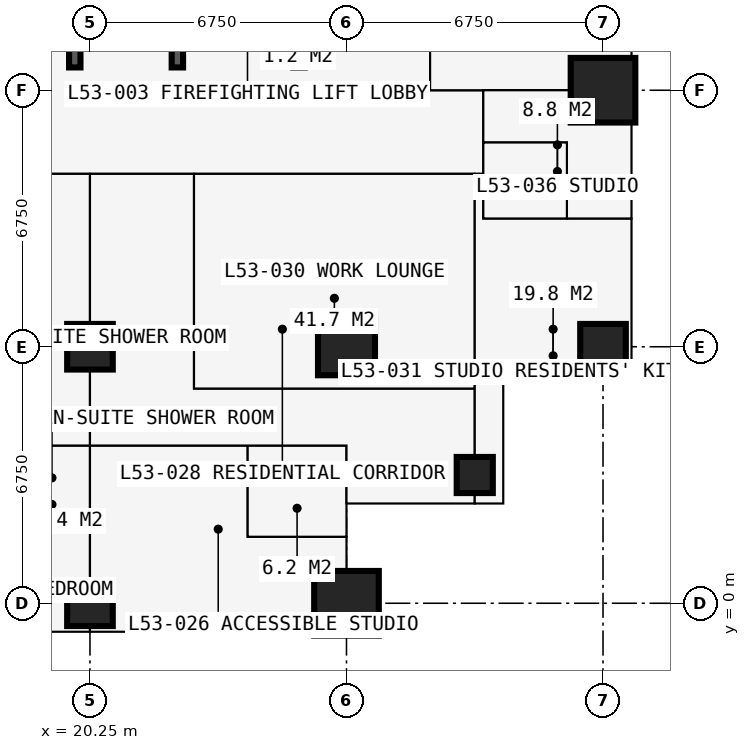
"""IFC4 building model, lengths in metres.
Left out: names, types, materials, properties, quantities, classifications, styles, units other than length and angle.
Written with IfcOpenShell. Run it as: python <this file> out.ifc"""

import sys

from ifc_helpers import new_model, si_unit, direction, frame, frame_2d, origin, origin_2d, place, context, subcontext, project, spatial, rectangle, extrude, element, fill, save


model = new_model("IFC4")
c1 = context("Model", 3, precision=1e-05, world=origin(), true_north=direction((0.0, 1.0)))
c2 = subcontext(c1, "Body", "Model", "MODEL_VIEW")
j1 = project(units=[si_unit("LENGTHUNIT", "METRE"), si_unit("PLANEANGLEUNIT", "RADIAN")], contexts=[c1])
p1 = place(None, origin())
s1 = spatial("IfcSite", under=j1, at=p1, CompositionType="ELEMENT")
p2 = place(p1, origin())
s2 = spatial("IfcBuilding", under=s1, at=p2, CompositionType="ELEMENT")
p3 = place(p2, frame((0.0, 0.0, 196.2)))
s3 = spatial("IfcBuildingStorey", under=s2, at=p3, CompositionType="ELEMENT", Elevation=196.2)
for number, where, z_axis, x_axis in (
    (1, (20.25, 0.0, 0.0), (0.0, 0.0, 1.0), (1.0, 0.0, 0.0)),
    (2, (20.25, 6.75, 0.0), (0.0, 0.0, 1.0), (1.0, 0.0, 0.0)),
):
    element("IfcColumn", number, at=place(p3, frame(where, z_axis=z_axis, x_axis=x_axis)), inside=s3, PredefinedType="COLUMN", context=c2, shape_type="SweptSolid", body=[
        extrude(rectangle(XDim=1.2, YDim=1.2, at=origin_2d()), origin(), (0.0, 0.0, 1.0), 3.6),
    ])
p4 = place(p3, frame((27.0, 0.0, 0.0), z_axis=(0.0, 0.0, 1.0), x_axis=(1.0, 0.0, 0.0)))
e3 = element("IfcColumn", 3, at=p4, inside=s3, PredefinedType="COLUMN", context=c2, shape_type="SweptSolid", body=[
    extrude(rectangle(XDim=1.7, YDim=1.7, at=origin_2d()), origin(), (0.0, 0.0, 1.0), 3.6),
])
p5 = place(p3, frame((27.0, 6.75, 0.0), z_axis=(0.0, 0.0, 1.0), x_axis=(1.0, 0.0, 0.0)))
e4 = element("IfcColumn", 4, at=p5, inside=s3, PredefinedType="COLUMN", context=c2, shape_type="SweptSolid", body=[
    extrude(rectangle(XDim=1.5, YDim=1.5, at=origin_2d()), origin(), (0.0, 0.0, 1.0), 3.6),
])
p6 = place(p3, frame((30.375, 3.375, 0.0), z_axis=(0.0, 0.0, 1.0), x_axis=(1.0, 0.0, 0.0)))
e5 = element("IfcColumn", 5, at=p6, inside=s3, PredefinedType="COLUMN", context=c2, shape_type="SweptSolid", body=[
    extrude(rectangle(XDim=0.95, YDim=0.95, at=origin_2d()), origin(), (0.0, 0.0, 1.0), 3.6),
])
p7 = place(p3, frame((33.75, 6.75, 0.0), z_axis=(0.0, 0.0, 1.0), x_axis=(1.0, 0.0, 0.0)))
e6 = element("IfcColumn", 6, at=p7, inside=s3, PredefinedType="COLUMN", context=c2, shape_type="SweptSolid", body=[
    extrude(rectangle(XDim=1.2, YDim=1.2, at=origin_2d()), origin(), (0.0, 0.0, 1.0), 3.6),
])
p8 = place(p3, frame((33.75, 13.5, 0.0), z_axis=(0.0, 0.0, 1.0), x_axis=(1.0, 0.0, 0.0)))
e7 = element("IfcColumn", 7, at=p8, inside=s3, PredefinedType="COLUMN", context=c2, shape_type="SweptSolid", body=[
    extrude(rectangle(XDim=1.7, YDim=1.7, at=origin_2d()), origin(), (0.0, 0.0, 1.0), 3.6),
])
p9 = place(p3, frame((13.1, 13.5, 0.0), z_axis=(0.0, 0.0, 1.0), x_axis=(1.0, 0.0, 0.0)))
e8 = element("IfcWall", 8, at=p9, inside=s3, PredefinedType="SHEAR", context=c2, shape_type="SweptSolid", body=[
    extrude(rectangle(XDim=14.3, YDim=1.2, at=frame_2d((7.15, 0.0))), origin(), (0.0, 0.0, 1.0), 3.6),
])
p10 = place(p3, frame((26.9, 14.1, 0.0), z_axis=(0.0, 0.0, 1.0), x_axis=(0.0, 1.0, 0.0)))
e9 = element("IfcWall", 9, at=p10, inside=s3, PredefinedType="SHEAR", context=c2, shape_type="SweptSolid", body=[
    extrude(rectangle(XDim=12.3, YDim=1.0, at=frame_2d((6.15, 0.0))), origin(), (0.0, 0.0, 1.0), 3.6),
])
p11 = place(p10, frame((3.65, 0.0, 0.0)))
e10 = element("IfcOpeningElement", 10, at=p11, cuts=e9, PredefinedType="OPENING", context=c2, shape_type="SweptSolid", body=[
    extrude(rectangle(XDim=1.2, YDim=2.2, at=frame_2d((0.6, 1.1))), frame((0.0, 0.51, 0.0), z_axis=(0.0, -1.0, 0.0), x_axis=(1.0, 0.0, 0.0)), (0.0, 0.0, 1.0), 1.02),
])
p12 = place(p3, frame((27.75, -0.75, 0.0), z_axis=(0.0, 0.0, 1.0), x_axis=(0.0, 1.0, 0.0)))
e11 = element("IfcWall", 11, at=p12, inside=s3, PredefinedType="SOLIDWALL", context=c2, shape_type="SweptSolid", body=[
    extrude(rectangle(XDim=3.375, YDim=0.3, at=frame_2d((1.688, 0.0))), origin(), (0.0, 0.0, 1.0), 3.3),
])
p13 = place(p12, frame((1.657, 0.0, 0.9)))
e12 = element("IfcOpeningElement", 12, at=p13, cuts=e11, PredefinedType="OPENING", context=c2, shape_type="SweptSolid", body=[
    extrude(rectangle(XDim=1.5, YDim=1.8, at=frame_2d((0.75, 0.9))), frame((0.0, 0.16, 0.0), z_axis=(0.0, -1.0, 0.0), x_axis=(1.0, 0.0, 0.0)), (0.0, 0.0, 1.0), 0.32),
])
p14 = place(p3, frame((27.75, 2.625, 0.0), z_axis=(0.0, 0.0, 1.0), x_axis=(1.0, 0.0, 0.0)))
e13 = element("IfcWall", 13, at=p14, inside=s3, PredefinedType="SOLIDWALL", context=c2, shape_type="SweptSolid", body=[
    extrude(rectangle(XDim=3.375, YDim=0.3, at=frame_2d((1.688, 0.0))), origin(), (0.0, 0.0, 1.0), 3.3),
])
p15 = place(p14, frame((0.788, 0.0, 0.6)))
e14 = element("IfcOpeningElement", 14, at=p15, cuts=e13, PredefinedType="OPENING", context=c2, shape_type="SweptSolid", body=[
    extrude(rectangle(XDim=1.8, YDim=2.1, at=frame_2d((0.9, 1.05))), frame((0.0, 0.16, 0.0), z_axis=(0.0, -1.0, 0.0), x_axis=(1.0, 0.0, 0.0)), (0.0, 0.0, 1.0), 0.32),
])
p16 = place(p3, frame((31.125, 2.625, 0.0), z_axis=(0.0, 0.0, 1.0), x_axis=(0.0, 1.0, 0.0)))
e15 = element("IfcWall", 15, at=p16, inside=s3, PredefinedType="SOLIDWALL", context=c2, shape_type="SweptSolid", body=[
    extrude(rectangle(XDim=3.375, YDim=0.3, at=frame_2d((1.688, 0.0))), origin(), (0.0, 0.0, 1.0), 3.3),
])
p17 = place(p16, frame((0.788, 0.0, 0.6)))
e16 = element("IfcOpeningElement", 16, at=p17, cuts=e15, PredefinedType="OPENING", context=c2, shape_type="SweptSolid", body=[
    extrude(rectangle(XDim=1.8, YDim=2.1, at=frame_2d((0.9, 1.05))), frame((0.0, 0.16, 0.0), z_axis=(0.0, -1.0, 0.0), x_axis=(1.0, 0.0, 0.0)), (0.0, 0.0, 1.0), 0.32),
])
p18 = place(p3, frame((31.125, 6.0, 0.0), z_axis=(0.0, 0.0, 1.0), x_axis=(1.0, 0.0, 0.0)))
e17 = element("IfcWall", 17, at=p18, inside=s3, PredefinedType="SOLIDWALL", context=c2, shape_type="SweptSolid", body=[
    extrude(rectangle(XDim=3.375, YDim=0.3, at=frame_2d((1.688, 0.0))), origin(), (0.0, 0.0, 1.0), 3.3),
])
p19 = place(p18, frame((0.788, 0.0, 0.6)))
e18 = element("IfcOpeningElement", 18, at=p19, cuts=e17, PredefinedType="OPENING", context=c2, shape_type="SweptSolid", body=[
    extrude(rectangle(XDim=1.8, YDim=2.1, at=frame_2d((0.9, 1.05))), frame((0.0, 0.16, 0.0), z_axis=(0.0, -1.0, 0.0), x_axis=(1.0, 0.0, 0.0)), (0.0, 0.0, 1.0), 0.32),
])
for number, where, z_axis, x_axis in (
    (19, (19.85, 14.1, 0.0), (0.0, 0.0, 1.0), (0.0, 1.0, 0.0)),
    (20, (22.55, 14.1, 0.0), (0.0, 0.0, 1.0), (0.0, 1.0, 0.0)),
    (21, (25.75, 14.1, 0.0), (0.0, 0.0, 1.0), (0.0, 1.0, 0.0)),
):
    element("IfcWall", number, at=place(p3, frame(where, z_axis=z_axis, x_axis=x_axis)), inside=s3, PredefinedType="SHEAR", context=c2, shape_type="SweptSolid", body=[
        extrude(rectangle(XDim=2.3, YDim=0.3, at=frame_2d((1.15, 0.0))), origin(), (0.0, 0.0, 1.0), 3.6),
    ])
p20 = place(p3, frame((6.75, 4.15, 0.0), z_axis=(0.0, 0.0, 1.0), x_axis=(1.0, 0.0, 0.0)))
e22 = element("IfcWall", 22, at=p20, inside=s3, PredefinedType="PARTITIONING", context=c2, shape_type="SweptSolid", body=[
    extrude(rectangle(XDim=20.25, YDim=0.15, at=frame_2d((10.125, 0.0))), origin(), (0.0, 0.0, 1.0), 3.3),
])
p21 = place(p20, frame((1.2, 0.0, 0.0)))
e23 = element("IfcOpeningElement", 23, at=p21, cuts=e22, PredefinedType="OPENING", context=c2, shape_type="SweptSolid", body=[
    extrude(rectangle(XDim=1.0, YDim=2.2, at=frame_2d((0.5, 1.1))), frame((0.0, 0.085, 0.0), z_axis=(0.0, -1.0, 0.0), x_axis=(1.0, 0.0, 0.0)), (0.0, 0.0, 1.0), 0.17),
])
p22 = place(p20, frame((3.575, 0.0, 0.0)))
e24 = element("IfcOpeningElement", 24, at=p22, cuts=e22, PredefinedType="OPENING", context=c2, shape_type="SweptSolid", body=[
    extrude(rectangle(XDim=0.95, YDim=2.2, at=frame_2d((0.475, 1.1))), frame((0.0, 0.085, 0.0), z_axis=(0.0, -1.0, 0.0), x_axis=(1.0, 0.0, 0.0)), (0.0, 0.0, 1.0), 0.17),
])
p23 = place(p20, frame((7.0, 0.0, 0.0)))
e25 = element("IfcOpeningElement", 25, at=p23, cuts=e22, PredefinedType="OPENING", context=c2, shape_type="SweptSolid", body=[
    extrude(rectangle(XDim=0.95, YDim=2.2, at=frame_2d((0.475, 1.1))), frame((0.0, 0.085, 0.0), z_axis=(0.0, -1.0, 0.0), x_axis=(1.0, 0.0, 0.0)), (0.0, 0.0, 1.0), 0.17),
])
p24 = place(p20, frame((10.375, 0.0, 0.0)))
e26 = element("IfcOpeningElement", 26, at=p24, cuts=e22, PredefinedType="OPENING", context=c2, shape_type="SweptSolid", body=[
    extrude(rectangle(XDim=0.95, YDim=2.2, at=frame_2d((0.475, 1.1))), frame((0.0, 0.085, 0.0), z_axis=(0.0, -1.0, 0.0), x_axis=(1.0, 0.0, 0.0)), (0.0, 0.0, 1.0), 0.17),
])
p25 = place(p20, frame((15.1, 0.0, 0.0)))
e27 = element("IfcOpeningElement", 27, at=p25, cuts=e22, PredefinedType="OPENING", context=c2, shape_type="SweptSolid", body=[
    extrude(rectangle(XDim=0.95, YDim=2.2, at=frame_2d((0.475, 1.1))), frame((0.0, 0.085, 0.0), z_axis=(0.0, -1.0, 0.0), x_axis=(1.0, 0.0, 0.0)), (0.0, 0.0, 1.0), 0.17),
])
p26 = place(p3, frame((10.125, 11.3, 0.0), z_axis=(0.0, 0.0, 1.0), x_axis=(1.0, 0.0, 0.0)))
e28 = element("IfcWall", 28, at=p26, inside=s3, PredefinedType="PARTITIONING", context=c2, shape_type="SweptSolid", body=[
    extrude(rectangle(XDim=20.475, YDim=0.15, at=frame_2d((10.238, 0.0))), origin(), (0.0, 0.0, 1.0), 3.3),
])
p27 = place(p26, frame((8.425, 0.0, 0.0)))
e29 = element("IfcOpeningElement", 29, at=p27, cuts=e28, PredefinedType="OPENING", context=c2, shape_type="SweptSolid", body=[
    extrude(rectangle(XDim=1.0, YDim=2.2, at=frame_2d((0.5, 1.1))), frame((0.0, 0.085, 0.0), z_axis=(0.0, -1.0, 0.0), x_axis=(1.0, 0.0, 0.0)), (0.0, 0.0, 1.0), 0.17),
])
p28 = place(p26, frame((10.975, 0.0, 0.0)))
e30 = element("IfcOpeningElement", 30, at=p28, cuts=e28, PredefinedType="OPENING", context=c2, shape_type="SweptSolid", body=[
    extrude(rectangle(XDim=1.0, YDim=2.2, at=frame_2d((0.5, 1.1))), frame((0.0, 0.085, 0.0), z_axis=(0.0, -1.0, 0.0), x_axis=(1.0, 0.0, 0.0)), (0.0, 0.0, 1.0), 0.17),
])
p29 = place(p26, frame((4.875, 0.0, 0.0)))
e31 = element("IfcOpeningElement", 31, at=p29, cuts=e28, PredefinedType="OPENING", context=c2, shape_type="SweptSolid", body=[
    extrude(rectangle(XDim=0.95, YDim=2.2, at=frame_2d((0.475, 1.1))), frame((0.0, 0.085, 0.0), z_axis=(0.0, -1.0, 0.0), x_axis=(1.0, 0.0, 0.0)), (0.0, 0.0, 1.0), 0.17),
])
p30 = place(p3, frame((18.25, 1.95, 0.0), z_axis=(0.0, 0.0, 1.0), x_axis=(1.0, 0.0, 0.0)))
e32 = element("IfcWall", 32, at=p30, inside=s3, PredefinedType="PARTITIONING", context=c2, shape_type="SweptSolid", body=[
    extrude(rectangle(XDim=2.0, YDim=0.1, at=frame_2d((1.0, 0.0))), origin(), (0.0, 0.0, 1.0), 3.3),
])
p31 = place(p3, frame((20.25, -0.734, 0.0), z_axis=(0.0, 0.0, 1.0), x_axis=(0.0, 1.0, 0.0)))
e33 = element("IfcWall", 33, at=p31, inside=s3, PredefinedType="PARTITIONING", context=c2, shape_type="SweptSolid", body=[
    extrude(rectangle(XDim=12.034, YDim=0.15, at=frame_2d((6.017, 0.0))), origin(), (0.0, 0.0, 1.0), 2.802),
])
p32 = place(p3, frame((22.988, 5.65, 0.0), z_axis=(0.0, 0.0, 1.0), x_axis=(1.0, 0.0, 0.0)))
e34 = element("IfcWall", 34, at=p32, inside=s3, PredefinedType="PARTITIONING", context=c2, shape_type="SweptSolid", body=[
    extrude(rectangle(XDim=7.387, YDim=0.15, at=frame_2d((3.694, 0.0))), origin(), (0.0, 0.0, 1.0), 3.3),
])
p33 = place(p32, frame((2.3, 0.0, 0.0)))
e35 = element("IfcOpeningElement", 35, at=p33, cuts=e34, PredefinedType="OPENING", context=c2, shape_type="SweptSolid", body=[
    extrude(rectangle(XDim=0.95, YDim=2.2, at=frame_2d((0.475, 1.1))), frame((0.0, 0.085, 0.0), z_axis=(0.0, -1.0, 0.0), x_axis=(1.0, 0.0, 0.0)), (0.0, 0.0, 1.0), 0.17),
])
p34 = place(p3, frame((22.988, 5.65, 0.0), z_axis=(0.0, 0.0, 1.0), x_axis=(0.0, 1.0, 0.0)))
e36 = element("IfcWall", 36, at=p34, inside=s3, PredefinedType="PARTITIONING", context=c2, shape_type="SweptSolid", body=[
    extrude(rectangle(XDim=5.65, YDim=0.15, at=frame_2d((2.825, 0.0))), origin(), (0.0, 0.0, 1.0), 3.3),
])
p35 = place(p3, frame((24.4, 1.75, 0.0), z_axis=(0.0, 0.0, 1.0), x_axis=(0.0, 1.0, 0.0)))
e37 = element("IfcWall", 37, at=p35, inside=s3, PredefinedType="PARTITIONING", context=c2, shape_type="SweptSolid", body=[
    extrude(rectangle(XDim=2.4, YDim=0.1, at=frame_2d((1.2, 0.0))), origin(), (0.0, 0.0, 1.0), 3.3),
])
p36 = place(p3, frame((24.4, 1.75, 0.0), z_axis=(0.0, 0.0, 1.0), x_axis=(1.0, 0.0, 0.0)))
e38 = element("IfcWall", 38, at=p36, inside=s3, PredefinedType="PARTITIONING", context=c2, shape_type="SweptSolid", body=[
    extrude(rectangle(XDim=2.6, YDim=0.1, at=frame_2d((1.3, 0.0))), origin(), (0.0, 0.0, 1.0), 3.3),
])
p37 = place(p36, frame((0.8, 0.0, 0.0)))
e39 = element("IfcOpeningElement", 39, at=p37, cuts=e38, PredefinedType="OPENING", context=c2, shape_type="SweptSolid", body=[
    extrude(rectangle(XDim=0.9, YDim=2.2, at=frame_2d((0.45, 1.1))), frame((0.0, 0.06, 0.0), z_axis=(0.0, -1.0, 0.0), x_axis=(1.0, 0.0, 0.0)), (0.0, 0.0, 1.0), 0.12),
])
p38 = place(p3, frame((27.0, -0.734, 0.0), z_axis=(0.0, 0.0, 1.0), x_axis=(0.0, 1.0, 0.0)))
e40 = element("IfcWall", 40, at=p38, inside=s3, PredefinedType="PARTITIONING", context=c2, shape_type="SweptSolid", body=[
    extrude(rectangle(XDim=4.884, YDim=0.175, at=frame_2d((2.442, 0.0))), origin(), (0.0, 0.0, 1.0), 2.802),
])
p39 = place(p3, frame((27.0, 2.625, 0.0), z_axis=(0.0, 0.0, 1.0), x_axis=(1.0, 0.0, 0.0)))
e41 = element("IfcWall", 41, at=p39, inside=s3, PredefinedType="PARTITIONING", context=c2, shape_type="SweptSolid", body=[
    extrude(rectangle(XDim=0.734, YDim=0.15, at=frame_2d((0.367, 0.0))), origin(), (0.0, 0.0, 1.0), 3.3),
])
p40 = place(p3, frame((29.2, 13.5, 0.0), z_axis=(0.0, 0.0, 1.0), x_axis=(0.0, 1.0, 0.0)))
e42 = element("IfcWall", 42, at=p40, inside=s3, PredefinedType="PARTITIONING", context=c2, shape_type="SweptSolid", body=[
    extrude(rectangle(XDim=15.7, YDim=0.2, at=frame_2d((7.85, 0.0))), origin(), (0.0, 0.0, 1.0), 3.3),
])
p41 = place(p40, frame((8.35, 0.0, 0.0)))
e43 = element("IfcOpeningElement", 43, at=p41, cuts=e42, PredefinedType="OPENING", context=c2, shape_type="SweptSolid", body=[
    extrude(rectangle(XDim=0.95, YDim=2.2, at=frame_2d((0.475, 1.1))), frame((0.0, 0.11, 0.0), z_axis=(0.0, -1.0, 0.0), x_axis=(1.0, 0.0, 0.0)), (0.0, 0.0, 1.0), 0.22),
])
p42 = place(p40, frame((1.6, 0.0, 0.0)))
e44 = element("IfcOpeningElement", 44, at=p42, cuts=e42, PredefinedType="OPENING", context=c2, shape_type="SweptSolid", body=[
    extrude(rectangle(XDim=0.95, YDim=2.2, at=frame_2d((0.475, 1.1))), frame((0.0, 0.11, 0.0), z_axis=(0.0, -1.0, 0.0), x_axis=(1.0, 0.0, 0.0)), (0.0, 0.0, 1.0), 0.22),
])
p43 = place(p40, frame((14.1, 0.0, 0.0)))
e45 = element("IfcOpeningElement", 45, at=p43, cuts=e42, PredefinedType="OPENING", context=c2, shape_type="SweptSolid", body=[
    extrude(rectangle(XDim=1.0, YDim=2.2, at=frame_2d((0.5, 1.1))), frame((0.0, 0.11, 0.0), z_axis=(0.0, -1.0, 0.0), x_axis=(1.0, 0.0, 0.0)), (0.0, 0.0, 1.0), 0.22),
])
p44 = place(p3, frame((29.2, 13.5, 0.0), z_axis=(0.0, 0.0, 1.0), x_axis=(1.0, 0.0, 0.0)))
e46 = element("IfcWall", 46, at=p44, inside=s3, PredefinedType="PARTITIONING", context=c2, shape_type="SweptSolid", body=[
    extrude(rectangle(XDim=5.284, YDim=0.175, at=frame_2d((2.642, 0.0))), origin(), (0.0, 0.0, 1.0), 2.802),
])
p45 = place(p3, frame((30.375, 2.775, 0.0), z_axis=(0.0, 0.0, 1.0), x_axis=(0.0, 1.0, 0.0)))
e47 = element("IfcWall", 47, at=p45, inside=s3, PredefinedType="PARTITIONING", context=c2, shape_type="SweptSolid", body=[
    extrude(rectangle(XDim=8.525, YDim=0.15, at=frame_2d((4.263, 0.0))), origin(), (0.0, 0.0, 1.0), 2.802),
])
p46 = place(p45, frame((1.116, 0.0, 0.0)))
e48 = element("IfcOpeningElement", 48, at=p46, cuts=e47, PredefinedType="OPENING", context=c2, shape_type="SweptSolid", body=[
    extrude(rectangle(XDim=1.0, YDim=2.2, at=frame_2d((0.5, 1.1))), frame((0.0, 0.085, 0.0), z_axis=(0.0, -1.0, 0.0), x_axis=(1.0, 0.0, 0.0)), (0.0, 0.0, 1.0), 0.17),
])
p47 = place(p3, frame((30.6, 10.125, 0.0), z_axis=(0.0, 0.0, 1.0), x_axis=(0.0, 1.0, 0.0)))
e49 = element("IfcWall", 49, at=p47, inside=s3, PredefinedType="PARTITIONING", context=c2, shape_type="SweptSolid", body=[
    extrude(rectangle(XDim=3.375, YDim=0.1, at=frame_2d((1.688, 0.0))), origin(), (0.0, 0.0, 1.0), 3.3),
])
p48 = place(p47, frame((2.2, 0.0, 0.0)))
e50 = element("IfcOpeningElement", 50, at=p48, cuts=e49, PredefinedType="OPENING", context=c2, shape_type="SweptSolid", body=[
    extrude(rectangle(XDim=0.95, YDim=2.2, at=frame_2d((0.475, 1.1))), frame((0.0, 0.06, 0.0), z_axis=(0.0, -1.0, 0.0), x_axis=(1.0, 0.0, 0.0)), (0.0, 0.0, 1.0), 0.12),
])
p49 = place(p3, frame((30.6, 10.125, 0.0), z_axis=(0.0, 0.0, 1.0), x_axis=(1.0, 0.0, 0.0)))
e51 = element("IfcWall", 51, at=p49, inside=s3, PredefinedType="PARTITIONING", context=c2, shape_type="SweptSolid", body=[
    extrude(rectangle(XDim=3.884, YDim=0.1, at=frame_2d((1.942, 0.0))), origin(), (0.0, 0.0, 1.0), 3.3),
])
p50 = place(p3, frame((30.6, 12.125, 0.0), z_axis=(0.0, 0.0, 1.0), x_axis=(1.0, 0.0, 0.0)))
e52 = element("IfcWall", 52, at=p50, inside=s3, PredefinedType="PARTITIONING", context=c2, shape_type="SweptSolid", body=[
    extrude(rectangle(XDim=2.2, YDim=0.1, at=frame_2d((1.1, 0.0))), origin(), (0.0, 0.0, 1.0), 3.3),
])
p51 = place(p50, frame((0.65, 0.0, 0.0)))
e53 = element("IfcOpeningElement", 53, at=p51, cuts=e52, PredefinedType="OPENING", context=c2, shape_type="SweptSolid", body=[
    extrude(rectangle(XDim=0.9, YDim=2.2, at=frame_2d((0.45, 1.1))), frame((0.0, 0.06, 0.0), z_axis=(0.0, -1.0, 0.0), x_axis=(1.0, 0.0, 0.0)), (0.0, 0.0, 1.0), 0.12),
])
p52 = place(p3, frame((32.8, 10.125, 0.0), z_axis=(0.0, 0.0, 1.0), x_axis=(0.0, 1.0, 0.0)))
e54 = element("IfcWall", 54, at=p52, inside=s3, PredefinedType="PARTITIONING", context=c2, shape_type="SweptSolid", body=[
    extrude(rectangle(XDim=2.0, YDim=0.1, at=frame_2d((1.0, 0.0))), origin(), (0.0, 0.0, 1.0), 3.3),
])
p53 = place(p13, origin())
e55 = element("IfcWindow", 55, at=p53, inside=s3, PartitioningType="SINGLE_PANEL", PredefinedType="WINDOW", context=c2, shape_type="SweptSolid", body=[
    extrude(rectangle(XDim=1.5, YDim=1.8, at=frame_2d((0.75, 0.9))), frame((0.0, 0.03, 0.0), z_axis=(0.0, -1.0, 0.0), x_axis=(1.0, 0.0, 0.0)), (0.0, 0.0, 1.0), 0.06),
])
fill(e12, e55)
p54 = place(p15, origin())
e56 = element("IfcWindow", 56, at=p54, inside=s3, PartitioningType="SINGLE_PANEL", PredefinedType="WINDOW", context=c2, shape_type="SweptSolid", body=[
    extrude(rectangle(XDim=1.8, YDim=2.1, at=frame_2d((0.9, 1.05))), frame((0.0, 0.03, 0.0), z_axis=(0.0, -1.0, 0.0), x_axis=(1.0, 0.0, 0.0)), (0.0, 0.0, 1.0), 0.06),
])
fill(e14, e56)
p55 = place(p17, origin())
e57 = element("IfcWindow", 57, at=p55, inside=s3, PartitioningType="SINGLE_PANEL", PredefinedType="WINDOW", context=c2, shape_type="SweptSolid", body=[
    extrude(rectangle(XDim=1.8, YDim=2.1, at=frame_2d((0.9, 1.05))), frame((0.0, 0.03, 0.0), z_axis=(0.0, -1.0, 0.0), x_axis=(1.0, 0.0, 0.0)), (0.0, 0.0, 1.0), 0.06),
])
fill(e16, e57)
p56 = place(p19, origin())
e58 = element("IfcWindow", 58, at=p56, inside=s3, PartitioningType="SINGLE_PANEL", PredefinedType="WINDOW", context=c2, shape_type="SweptSolid", body=[
    extrude(rectangle(XDim=1.8, YDim=2.1, at=frame_2d((0.9, 1.05))), frame((0.0, 0.03, 0.0), z_axis=(0.0, -1.0, 0.0), x_axis=(1.0, 0.0, 0.0)), (0.0, 0.0, 1.0), 0.06),
])
fill(e18, e58)
p57 = place(p27, origin())
e59 = element("IfcDoor", 59, at=p57, inside=s3, OperationType="SINGLE_SWING_LEFT", PredefinedType="DOOR", context=c2, shape_type="SweptSolid", body=[
    extrude(rectangle(XDim=1.0, YDim=2.2, at=frame_2d((0.5, 1.1))), frame((0.0, 0.025, 0.0), z_axis=(0.0, -1.0, 0.0), x_axis=(1.0, 0.0, 0.0)), (0.0, 0.0, 1.0), 0.05),
])
fill(e29, e59)
p58 = place(p25, origin())
e60 = element("IfcDoor", 60, at=p58, inside=s3, OperationType="SINGLE_SWING_LEFT", PredefinedType="DOOR", context=c2, shape_type="SweptSolid", body=[
    extrude(rectangle(XDim=0.95, YDim=2.2, at=frame_2d((0.475, 1.1))), frame((0.0, 0.025, 0.0), z_axis=(0.0, -1.0, 0.0), x_axis=(1.0, 0.0, 0.0)), (0.0, 0.0, 1.0), 0.05),
])
fill(e27, e60)
p59 = place(p37, origin())
e61 = element("IfcDoor", 61, at=p59, inside=s3, OperationType="SINGLE_SWING_RIGHT", PredefinedType="DOOR", context=c2, shape_type="SweptSolid", body=[
    extrude(rectangle(XDim=0.9, YDim=2.2, at=frame_2d((0.45, 1.1))), frame((0.0, 0.025, 0.0), z_axis=(0.0, -1.0, 0.0), x_axis=(1.0, 0.0, 0.0)), (0.0, 0.0, 1.0), 0.05),
])
fill(e39, e61)
p60 = place(p28, origin())
e62 = element("IfcDoor", 62, at=p60, inside=s3, OperationType="SINGLE_SWING_LEFT", PredefinedType="DOOR", context=c2, shape_type="SweptSolid", body=[
    extrude(rectangle(XDim=1.0, YDim=2.2, at=frame_2d((0.5, 1.1))), frame((0.0, 0.025, 0.0), z_axis=(0.0, -1.0, 0.0), x_axis=(1.0, 0.0, 0.0)), (0.0, 0.0, 1.0), 0.05),
])
fill(e30, e62)
p61 = place(p33, origin())
e63 = element("IfcDoor", 63, at=p61, inside=s3, OperationType="SINGLE_SWING_LEFT", PredefinedType="DOOR", context=c2, shape_type="SweptSolid", body=[
    extrude(rectangle(XDim=0.95, YDim=2.2, at=frame_2d((0.475, 1.1))), frame((0.0, 0.025, 0.0), z_axis=(0.0, -1.0, 0.0), x_axis=(1.0, 0.0, 0.0)), (0.0, 0.0, 1.0), 0.05),
])
fill(e35, e63)
p62 = place(p46, origin())
e64 = element("IfcDoor", 64, at=p62, inside=s3, OperationType="SINGLE_SWING_LEFT", PredefinedType="DOOR", context=c2, shape_type="SweptSolid", body=[
    extrude(rectangle(XDim=1.0, YDim=2.2, at=frame_2d((0.5, 1.1))), frame((0.0, 0.025, 0.0), z_axis=(0.0, -1.0, 0.0), x_axis=(1.0, 0.0, 0.0)), (0.0, 0.0, 1.0), 0.05),
])
fill(e48, e64)
p63 = place(p48, origin())
e65 = element("IfcDoor", 65, at=p63, inside=s3, OperationType="SINGLE_SWING_LEFT", PredefinedType="DOOR", context=c2, shape_type="SweptSolid", body=[
    extrude(rectangle(XDim=0.95, YDim=2.2, at=frame_2d((0.475, 1.1))), frame((0.0, 0.025, 0.0), z_axis=(0.0, -1.0, 0.0), x_axis=(1.0, 0.0, 0.0)), (0.0, 0.0, 1.0), 0.05),
])
fill(e50, e65)
p64 = place(p51, origin())
e66 = element("IfcDoor", 66, at=p64, inside=s3, OperationType="SINGLE_SWING_RIGHT", PredefinedType="DOOR", context=c2, shape_type="SweptSolid", body=[
    extrude(rectangle(XDim=0.9, YDim=2.2, at=frame_2d((0.45, 1.1))), frame((0.0, 0.025, 0.0), z_axis=(0.0, -1.0, 0.0), x_axis=(1.0, 0.0, 0.0)), (0.0, 0.0, 1.0), 0.05),
])
fill(e53, e66)
save(model, sys.argv[1])
